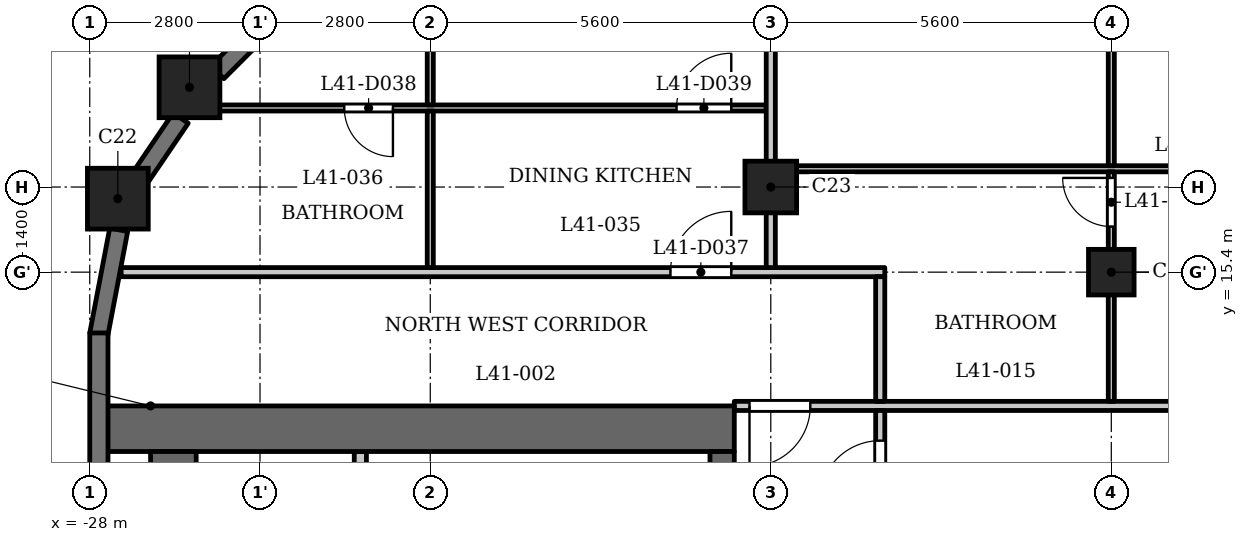
"""IFC4 building model, lengths in metres.
Left out: names, types, materials, properties, quantities, classifications, styles, units other than length and angle.
Written with IfcOpenShell. Run it as: python <this file> out.ifc"""

import sys

from ifc_helpers import new_model, si_unit, direction, frame, frame_2d, origin, origin_2d, place, context, subcontext, project, spatial, rectangle, extrude, element, fill, save


model = new_model("IFC4")
c1 = context("Model", 3, precision=1e-05, world=origin(), true_north=direction((0.0, 1.0)))
c2 = subcontext(c1, "Body", "Model", "MODEL_VIEW")
j1 = project(units=[si_unit("LENGTHUNIT", "METRE"), si_unit("PLANEANGLEUNIT", "RADIAN")], contexts=[c1])
p1 = place(None, origin())
s1 = spatial("IfcSite", under=j1, at=p1, CompositionType="ELEMENT")
p2 = place(p1, origin())
s2 = spatial("IfcBuilding", under=s1, at=p2, CompositionType="ELEMENT")
p3 = place(p2, frame((0.0, 0.0, 160.6)))
s3 = spatial("IfcBuildingStorey", under=s2, at=p3, CompositionType="ELEMENT", Elevation=160.6)
for number, where, z_axis, x_axis in (
    (1, (-26.36, 18.44, 0.0), (0.0, 0.0, 1.0), (1.0, 0.0, 0.0)),
    (2, (-27.538, 16.609, 0.0), (0.0, 0.0, 1.0), (1.0, 0.0, 0.0)),
):
    element("IfcColumn", number, at=place(p3, frame(where, z_axis=z_axis, x_axis=x_axis)), inside=s3, PredefinedType="COLUMN", context=c2, shape_type="SweptSolid", body=[
        extrude(rectangle(XDim=1.0, YDim=1.0, at=origin_2d()), origin(), (0.0, 0.0, 1.0), 3.5),
    ])
p4 = place(p3, frame((-16.8, 16.8, 0.0), z_axis=(0.0, 0.0, 1.0), x_axis=(1.0, 0.0, 0.0)))
e3 = element("IfcColumn", 3, at=p4, inside=s3, PredefinedType="COLUMN", context=c2, shape_type="SweptSolid", body=[
    extrude(rectangle(XDim=0.85, YDim=0.85, at=origin_2d()), origin(), (0.0, 0.0, 1.0), 3.5),
])
p5 = place(p3, frame((-11.2, 15.4, 0.0), z_axis=(0.0, 0.0, 1.0), x_axis=(1.0, 0.0, 0.0)))
e4 = element("IfcColumn", 4, at=p5, inside=s3, PredefinedType="COLUMN", context=c2, shape_type="SweptSolid", body=[
    extrude(rectangle(XDim=0.75, YDim=0.75, at=origin_2d()), origin(), (0.0, 0.0, 1.0), 3.5),
])
p6 = place(p3, frame((-23.991, 20.597, 0.0), z_axis=(0.0, 0.0, 1.0), x_axis=(-0.707106781187, -0.707106781187, 0.0)))
e5 = element("IfcWall", 5, at=p6, inside=s3, PredefinedType="SOLIDWALL", context=c2, shape_type="SweptSolid", body=[
    extrude(rectangle(XDim=2.7, YDim=0.3, at=frame_2d((1.35, 0.0))), origin(), (0.0, 0.0, 1.0), 2.45),
])
p7 = place(p6, frame((0.75, 0.0, 0.6)))
e6 = element("IfcOpeningElement", 6, at=p7, cuts=e5, PredefinedType="OPENING", context=c2, shape_type="SweptSolid", body=[
    extrude(rectangle(XDim=1.2, YDim=1.55, at=frame_2d((0.6, 0.775))), frame((0.0, 0.16, 0.0), z_axis=(0.0, -1.0, 0.0), x_axis=(1.0, 0.0, 0.0)), (0.0, 0.0, 1.0), 0.32),
])
p8 = place(p3, frame((-26.504, 17.934, 0.0), z_axis=(0.0, 0.0, 1.0), x_axis=(-0.562145470373, -0.827038372833, 0.0)))
e7 = element("IfcWall", 7, at=p8, inside=s3, PredefinedType="SOLIDWALL", context=c2, shape_type="SweptSolid", body=[
    extrude(rectangle(XDim=1.177, YDim=0.3, at=frame_2d((0.588, 0.0))), origin(), (0.0, 0.0, 1.0), 3.2),
])
p9 = place(p3, frame((-27.524, 16.097, 0.0), z_axis=(0.0, 0.0, 1.0), x_axis=(-0.187259034321, -0.982310569049, 0.0)))
e8 = element("IfcWall", 8, at=p9, inside=s3, PredefinedType="SOLIDWALL", context=c2, shape_type="SweptSolid", body=[
    extrude(rectangle(XDim=1.756, YDim=0.3, at=frame_2d((0.878, 0.0))), origin(), (0.0, 0.0, 1.0), 2.45),
])
p10 = place(p3, frame((-27.85, 14.4, 0.0), z_axis=(0.0, 0.0, 1.0), x_axis=(0.0, -1.0, 0.0)))
e9 = element("IfcWall", 9, at=p10, inside=s3, PredefinedType="SOLIDWALL", context=c2, shape_type="SweptSolid", body=[
    extrude(rectangle(XDim=2.7, YDim=0.3, at=frame_2d((1.35, 0.0))), origin(), (0.0, 0.0, 1.0), 2.45),
])
p11 = place(p3, frame((-17.4, 12.825, 0.0), z_axis=(0.0, 0.0, 1.0), x_axis=(-1.0, 0.0, 0.0)))
e10 = element("IfcWall", 10, at=p11, inside=s3, PredefinedType="SHEAR", context=c2, shape_type="SweptSolid", body=[
    extrude(rectangle(XDim=10.4, YDim=0.75, at=frame_2d((5.2, 0.0))), origin(), (0.0, 0.0, 1.0), 3.2),
])
p12 = place(p3, frame((-17.6, -12.45, 0.0), z_axis=(0.0, 0.0, 1.0), x_axis=(0.0, 1.0, 0.0)))
e11 = element("IfcWall", 11, at=p12, inside=s3, PredefinedType="SHEAR", context=c2, shape_type="SweptSolid", body=[
    extrude(rectangle(XDim=24.9, YDim=0.4, at=frame_2d((12.45, 0.0))), origin(), (0.0, 0.0, 1.0), 3.2),
])
p13 = place(p12, frame((8.65, 0.0, 0.0)))
e12 = element("IfcOpeningElement", 12, at=p13, cuts=e11, PredefinedType="OPENING", context=c2, shape_type="SweptSolid", body=[
    extrude(rectangle(XDim=0.9, YDim=2.1, at=frame_2d((0.45, 1.05))), frame((0.0, 0.21, 0.0), z_axis=(0.0, -1.0, 0.0), x_axis=(1.0, 0.0, 0.0)), (0.0, 0.0, 1.0), 0.42),
])
p14 = place(p12, frame((15.6, 0.0, 0.0)))
e13 = element("IfcOpeningElement", 13, at=p14, cuts=e11, PredefinedType="OPENING", context=c2, shape_type="SweptSolid", body=[
    extrude(rectangle(XDim=1.1, YDim=2.1, at=frame_2d((0.55, 1.05))), frame((0.0, 0.21, 0.0), z_axis=(0.0, -1.0, 0.0), x_axis=(1.0, 0.0, 0.0)), (0.0, 0.0, 1.0), 0.42),
])
p15 = place(p12, frame((18.0, 0.0, 0.0)))
e14 = element("IfcOpeningElement", 14, at=p15, cuts=e11, PredefinedType="OPENING", context=c2, shape_type="SweptSolid", body=[
    extrude(rectangle(XDim=1.1, YDim=2.1, at=frame_2d((0.55, 1.05))), frame((0.0, 0.21, 0.0), z_axis=(0.0, -1.0, 0.0), x_axis=(1.0, 0.0, 0.0)), (0.0, 0.0, 1.0), 0.42),
])
p16 = place(p12, frame((23.025, 0.0, 0.0)))
e15 = element("IfcOpeningElement", 15, at=p16, cuts=e11, PredefinedType="OPENING", context=c2, shape_type="SweptSolid", body=[
    extrude(rectangle(XDim=1.1, YDim=2.1, at=frame_2d((0.55, 1.05))), frame((0.0, 0.21, 0.0), z_axis=(0.0, -1.0, 0.0), x_axis=(1.0, 0.0, 0.0)), (0.0, 0.0, 1.0), 0.42),
])
p17 = place(p12, frame((0.775, 0.0, 0.0)))
e16 = element("IfcOpeningElement", 16, at=p17, cuts=e11, PredefinedType="OPENING", context=c2, shape_type="SweptSolid", body=[
    extrude(rectangle(XDim=1.1, YDim=2.1, at=frame_2d((0.55, 1.05))), frame((0.0, 0.21, 0.0), z_axis=(0.0, -1.0, 0.0), x_axis=(1.0, 0.0, 0.0)), (0.0, 0.0, 1.0), 0.42),
])
p18 = place(p12, frame((12.925, 0.0, 0.0)))
e17 = element("IfcOpeningElement", 17, at=p18, cuts=e11, PredefinedType="OPENING", context=c2, shape_type="SweptSolid", body=[
    extrude(rectangle(XDim=1.8, YDim=2.1, at=frame_2d((0.9, 1.05))), frame((0.0, 0.21, 0.0), z_axis=(0.0, -1.0, 0.0), x_axis=(1.0, 0.0, 0.0)), (0.0, 0.0, 1.0), 0.42),
])
p19 = place(p3, frame((-26.625, -12.45, 0.0), z_axis=(0.0, 0.0, 1.0), x_axis=(0.0, 1.0, 0.0)))
e18 = element("IfcWall", 18, at=p19, inside=s3, PredefinedType="SHEAR", context=c2, shape_type="SweptSolid", body=[
    extrude(rectangle(XDim=24.9, YDim=0.75, at=frame_2d((12.45, 0.0))), origin(), (0.0, 0.0, 1.0), 3.2),
])
p20 = place(p3, frame((-23.55, 9.8, 0.0), z_axis=(0.0, 0.0, 1.0), x_axis=(0.0, 1.0, 0.0)))
e19 = element("IfcWall", 19, at=p20, inside=s3, PredefinedType="PARTITIONING", context=c2, shape_type="SweptSolid", body=[
    extrude(rectangle(XDim=2.65, YDim=0.2, at=frame_2d((1.325, 0.0))), origin(), (0.0, 0.0, 1.0), 3.2),
])
p21 = place(p20, frame((0.875, 0.0, 0.0)))
e20 = element("IfcOpeningElement", 20, at=p21, cuts=e19, PredefinedType="OPENING", context=c2, shape_type="SweptSolid", body=[
    extrude(rectangle(XDim=0.9, YDim=2.1, at=frame_2d((0.45, 1.05))), frame((0.0, 0.11, 0.0), z_axis=(0.0, -1.0, 0.0), x_axis=(1.0, 0.0, 0.0)), (0.0, 0.0, 1.0), 0.22),
])
p22 = place(p3, frame((-17.4, 13.2, 0.0), z_axis=(0.0, 0.0, 1.0), x_axis=(1.0, 0.0, 0.0)))
e21 = element("IfcWall", 21, at=p22, inside=s3, PredefinedType="PARTITIONING", context=c2, shape_type="SweptSolid", body=[
    extrude(rectangle(XDim=34.8, YDim=0.15, at=frame_2d((17.4, 0.0))), origin(), (0.0, 0.0, 1.0), 3.2),
])
p23 = place(p22, frame((0.25, 0.0, 0.0)))
e22 = element("IfcOpeningElement", 22, at=p23, cuts=e21, PredefinedType="OPENING", context=c2, shape_type="SweptSolid", body=[
    extrude(rectangle(XDim=1.0, YDim=2.1, at=frame_2d((0.5, 1.05))), frame((0.0, 0.085, 0.0), z_axis=(0.0, -1.0, 0.0), x_axis=(1.0, 0.0, 0.0)), (0.0, 0.0, 1.0), 0.17),
])
p24 = place(p22, frame((33.65, 0.0, 0.0)))
e23 = element("IfcOpeningElement", 23, at=p24, cuts=e21, PredefinedType="OPENING", context=c2, shape_type="SweptSolid", body=[
    extrude(rectangle(XDim=1.0, YDim=2.1, at=frame_2d((0.5, 1.05))), frame((0.0, 0.085, 0.0), z_axis=(0.0, -1.0, 0.0), x_axis=(1.0, 0.0, 0.0)), (0.0, 0.0, 1.0), 0.17),
])
p25 = place(p22, frame((15.75, 0.0, 0.0)))
e24 = element("IfcOpeningElement", 24, at=p25, cuts=e21, PredefinedType="OPENING", context=c2, shape_type="SweptSolid", body=[
    extrude(rectangle(XDim=1.0, YDim=2.1, at=frame_2d((0.5, 1.05))), frame((0.0, 0.085, 0.0), z_axis=(0.0, -1.0, 0.0), x_axis=(1.0, 0.0, 0.0)), (0.0, 0.0, 1.0), 0.17),
])
p26 = place(p22, frame((20.85, 0.0, 0.0)))
e25 = element("IfcOpeningElement", 25, at=p26, cuts=e21, PredefinedType="OPENING", context=c2, shape_type="SweptSolid", body=[
    extrude(rectangle(XDim=1.0, YDim=2.1, at=frame_2d((0.5, 1.05))), frame((0.0, 0.085, 0.0), z_axis=(0.0, -1.0, 0.0), x_axis=(1.0, 0.0, 0.0)), (0.0, 0.0, 1.0), 0.17),
])
p27 = place(p22, frame((23.55, 0.0, 0.0)))
e26 = element("IfcOpeningElement", 26, at=p27, cuts=e21, PredefinedType="OPENING", context=c2, shape_type="SweptSolid", body=[
    extrude(rectangle(XDim=1.0, YDim=2.1, at=frame_2d((0.5, 1.05))), frame((0.0, 0.085, 0.0), z_axis=(0.0, -1.0, 0.0), x_axis=(1.0, 0.0, 0.0)), (0.0, 0.0, 1.0), 0.17),
])
p28 = place(p3, frame((-27.484, 15.4, 0.0), z_axis=(0.0, 0.0, 1.0), x_axis=(1.0, 0.0, 0.0)))
e27 = element("IfcWall", 27, at=p28, inside=s3, PredefinedType="PARTITIONING", context=c2, shape_type="SweptSolid", body=[
    extrude(rectangle(XDim=12.559, YDim=0.15, at=frame_2d((6.279, 0.0))), origin(), (0.0, 0.0, 1.0), 3.2),
])
p29 = place(p28, frame((9.034, 0.0, 0.0)))
e28 = element("IfcOpeningElement", 28, at=p29, cuts=e27, PredefinedType="OPENING", context=c2, shape_type="SweptSolid", body=[
    extrude(rectangle(XDim=1.0, YDim=2.1, at=frame_2d((0.5, 1.05))), frame((0.0, 0.085, 0.0), z_axis=(0.0, -1.0, 0.0), x_axis=(1.0, 0.0, 0.0)), (0.0, 0.0, 1.0), 0.17),
])
p30 = place(p3, frame((-16.725, 17.1, 0.0), z_axis=(0.0, 0.0, 1.0), x_axis=(1.0, 0.0, 0.0)))
e29 = element("IfcWall", 29, at=p30, inside=s3, PredefinedType="PARTITIONING", context=c2, shape_type="SweptSolid", body=[
    extrude(rectangle(XDim=33.45, YDim=0.1, at=frame_2d((16.725, 0.0))), origin(), (0.0, 0.0, 1.0), 3.2),
])
p31 = place(p30, frame((11.925, 0.0, 0.0)))
e30 = element("IfcOpeningElement", 30, at=p31, cuts=e29, PredefinedType="OPENING", context=c2, shape_type="SweptSolid", body=[
    extrude(rectangle(XDim=0.9, YDim=2.1, at=frame_2d((0.45, 1.05))), frame((0.0, 0.06, 0.0), z_axis=(0.0, -1.0, 0.0), x_axis=(1.0, 0.0, 0.0)), (0.0, 0.0, 1.0), 0.12),
])
p32 = place(p30, frame((15.175, 0.0, 0.0)))
e31 = element("IfcOpeningElement", 31, at=p32, cuts=e29, PredefinedType="OPENING", context=c2, shape_type="SweptSolid", body=[
    extrude(rectangle(XDim=0.9, YDim=2.1, at=frame_2d((0.45, 1.05))), frame((0.0, 0.06, 0.0), z_axis=(0.0, -1.0, 0.0), x_axis=(1.0, 0.0, 0.0)), (0.0, 0.0, 1.0), 0.12),
])
p33 = place(p30, frame((6.575, 0.0, 0.0)))
e32 = element("IfcOpeningElement", 32, at=p33, cuts=e29, PredefinedType="OPENING", context=c2, shape_type="SweptSolid", body=[
    extrude(rectangle(XDim=0.9, YDim=2.1, at=frame_2d((0.45, 1.05))), frame((0.0, 0.06, 0.0), z_axis=(0.0, -1.0, 0.0), x_axis=(1.0, 0.0, 0.0)), (0.0, 0.0, 1.0), 0.12),
])
p34 = place(p30, frame((17.375, 0.0, 0.0)))
e33 = element("IfcOpeningElement", 33, at=p34, cuts=e29, PredefinedType="OPENING", context=c2, shape_type="SweptSolid", body=[
    extrude(rectangle(XDim=0.8, YDim=2.1, at=frame_2d((0.4, 1.05))), frame((0.0, 0.06, 0.0), z_axis=(0.0, -1.0, 0.0), x_axis=(1.0, 0.0, 0.0)), (0.0, 0.0, 1.0), 0.12),
])
p35 = place(p30, frame((20.025, 0.0, 0.0)))
e34 = element("IfcOpeningElement", 34, at=p35, cuts=e29, PredefinedType="OPENING", context=c2, shape_type="SweptSolid", body=[
    extrude(rectangle(XDim=0.9, YDim=2.1, at=frame_2d((0.45, 1.05))), frame((0.0, 0.06, 0.0), z_axis=(0.0, -1.0, 0.0), x_axis=(1.0, 0.0, 0.0)), (0.0, 0.0, 1.0), 0.12),
])
p36 = place(p30, frame((26.425, 0.0, 0.0)))
e35 = element("IfcOpeningElement", 35, at=p36, cuts=e29, PredefinedType="OPENING", context=c2, shape_type="SweptSolid", body=[
    extrude(rectangle(XDim=0.8, YDim=2.1, at=frame_2d((0.4, 1.05))), frame((0.0, 0.06, 0.0), z_axis=(0.0, -1.0, 0.0), x_axis=(1.0, 0.0, 0.0)), (0.0, 0.0, 1.0), 0.12),
])
p37 = place(p30, frame((23.025, 0.0, 0.0)))
e36 = element("IfcOpeningElement", 36, at=p37, cuts=e29, PredefinedType="OPENING", context=c2, shape_type="SweptSolid", body=[
    extrude(rectangle(XDim=0.9, YDim=2.1, at=frame_2d((0.45, 1.05))), frame((0.0, 0.06, 0.0), z_axis=(0.0, -1.0, 0.0), x_axis=(1.0, 0.0, 0.0)), (0.0, 0.0, 1.0), 0.12),
])
p38 = place(p30, frame((28.575, 0.0, 0.0)))
e37 = element("IfcOpeningElement", 37, at=p38, cuts=e29, PredefinedType="OPENING", context=c2, shape_type="SweptSolid", body=[
    extrude(rectangle(XDim=0.8, YDim=2.1, at=frame_2d((0.4, 1.05))), frame((0.0, 0.06, 0.0), z_axis=(0.0, -1.0, 0.0), x_axis=(1.0, 0.0, 0.0)), (0.0, 0.0, 1.0), 0.12),
])
p39 = place(p30, frame((30.725, 0.0, 0.0)))
e38 = element("IfcOpeningElement", 38, at=p39, cuts=e29, PredefinedType="OPENING", context=c2, shape_type="SweptSolid", body=[
    extrude(rectangle(XDim=0.9, YDim=2.1, at=frame_2d((0.45, 1.05))), frame((0.0, 0.06, 0.0), z_axis=(0.0, -1.0, 0.0), x_axis=(1.0, 0.0, 0.0)), (0.0, 0.0, 1.0), 0.12),
])
p40 = place(p3, frame((-26.44, 18.1, 0.0), z_axis=(0.0, 0.0, 1.0), x_axis=(1.0, 0.0, 0.0)))
e39 = element("IfcWall", 39, at=p40, inside=s3, PredefinedType="PARTITIONING", context=c2, shape_type="SweptSolid", body=[
    extrude(rectangle(XDim=9.565, YDim=0.1, at=frame_2d((4.782, 0.0))), origin(), (0.0, 0.0, 1.0), 3.2),
])
p41 = place(p40, frame((2.626, 0.0, 0.0)))
e40 = element("IfcOpeningElement", 40, at=p41, cuts=e39, PredefinedType="OPENING", context=c2, shape_type="SweptSolid", body=[
    extrude(rectangle(XDim=0.8, YDim=2.1, at=frame_2d((0.4, 1.05))), frame((0.0, 0.06, 0.0), z_axis=(0.0, -1.0, 0.0), x_axis=(1.0, 0.0, 0.0)), (0.0, 0.0, 1.0), 0.12),
])
p42 = place(p40, frame((8.09, 0.0, 0.0)))
e41 = element("IfcOpeningElement", 41, at=p42, cuts=e39, PredefinedType="OPENING", context=c2, shape_type="SweptSolid", body=[
    extrude(rectangle(XDim=0.9, YDim=2.1, at=frame_2d((0.45, 1.05))), frame((0.0, 0.06, 0.0), z_axis=(0.0, -1.0, 0.0), x_axis=(1.0, 0.0, 0.0)), (0.0, 0.0, 1.0), 0.12),
])
p43 = place(p3, frame((-22.4, 15.475, 0.0), z_axis=(0.0, 0.0, 1.0), x_axis=(0.0, 1.0, 0.0)))
e42 = element("IfcWall", 42, at=p43, inside=s3, PredefinedType="PARTITIONING", context=c2, shape_type="SweptSolid", body=[
    extrude(rectangle(XDim=2.575, YDim=0.1, at=frame_2d((1.288, 0.0))), origin(), (0.0, 0.0, 1.0), 3.2),
])
p44 = place(p3, frame((-22.4, 18.15, 0.0), z_axis=(0.0, 0.0, 1.0), x_axis=(0.0, 1.0, 0.0)))
e43 = element("IfcWall", 43, at=p44, inside=s3, PredefinedType="PARTITIONING", context=c2, shape_type="SweptSolid", body=[
    extrude(rectangle(XDim=3.57, YDim=0.1, at=frame_2d((1.785, 0.0))), origin(), (0.0, 0.0, 1.0), 3.2),
])
p45 = place(p44, frame((1.298, 0.0, 0.0)))
e44 = element("IfcOpeningElement", 44, at=p45, cuts=e43, PredefinedType="OPENING", context=c2, shape_type="SweptSolid", body=[
    extrude(rectangle(XDim=0.9, YDim=2.1, at=frame_2d((0.45, 1.05))), frame((0.0, 0.06, 0.0), z_axis=(0.0, -1.0, 0.0), x_axis=(1.0, 0.0, 0.0)), (0.0, 0.0, 1.0), 0.12),
])
p46 = place(p3, frame((-16.8, 15.475, 0.0), z_axis=(0.0, 0.0, 1.0), x_axis=(0.0, 1.0, 0.0)))
e45 = element("IfcWall", 45, at=p46, inside=s3, PredefinedType="PARTITIONING", context=c2, shape_type="SweptSolid", body=[
    extrude(rectangle(XDim=7.405, YDim=0.15, at=frame_2d((3.702, 0.0))), origin(), (0.0, 0.0, 1.0), 3.2),
])
p47 = place(p3, frame((-15.0, 6.769, 0.0), z_axis=(0.0, 0.0, 1.0), x_axis=(0.0, 1.0, 0.0)))
e46 = element("IfcWall", 46, at=p47, inside=s3, PredefinedType="PARTITIONING", context=c2, shape_type="SweptSolid", body=[
    extrude(rectangle(XDim=6.356, YDim=0.15, at=frame_2d((3.178, 0.0))), origin(), (0.0, 0.0, 1.0), 3.2),
])
p48 = place(p47, frame((4.86, 0.0, 0.0)))
e47 = element("IfcOpeningElement", 47, at=p48, cuts=e46, PredefinedType="OPENING", context=c2, shape_type="SweptSolid", body=[
    extrude(rectangle(XDim=1.0, YDim=2.1, at=frame_2d((0.5, 1.05))), frame((0.0, 0.085, 0.0), z_axis=(0.0, -1.0, 0.0), x_axis=(1.0, 0.0, 0.0)), (0.0, 0.0, 1.0), 0.17),
])
p49 = place(p3, frame((-15.0, 13.275, 0.0), z_axis=(0.0, 0.0, 1.0), x_axis=(0.0, 1.0, 0.0)))
e48 = element("IfcWall", 48, at=p49, inside=s3, PredefinedType="PARTITIONING", context=c2, shape_type="SweptSolid", body=[
    extrude(rectangle(XDim=2.05, YDim=0.15, at=frame_2d((1.025, 0.0))), origin(), (0.0, 0.0, 1.0), 3.2),
])
p50 = place(p3, frame((-11.2, 13.275, 0.0), z_axis=(0.0, 0.0, 1.0), x_axis=(0.0, 1.0, 0.0)))
e49 = element("IfcWall", 49, at=p50, inside=s3, PredefinedType="PARTITIONING", context=c2, shape_type="SweptSolid", body=[
    extrude(rectangle(XDim=3.775, YDim=0.1, at=frame_2d((1.888, 0.0))), origin(), (0.0, 0.0, 1.0), 3.2),
])
p51 = place(p50, frame((2.875, 0.0, 0.0)))
e50 = element("IfcOpeningElement", 50, at=p51, cuts=e49, PredefinedType="OPENING", context=c2, shape_type="SweptSolid", body=[
    extrude(rectangle(XDim=0.8, YDim=2.1, at=frame_2d((0.4, 1.05))), frame((0.0, 0.06, 0.0), z_axis=(0.0, -1.0, 0.0), x_axis=(1.0, 0.0, 0.0)), (0.0, 0.0, 1.0), 0.12),
])
p52 = place(p3, frame((-11.2, 17.15, 0.0), z_axis=(0.0, 0.0, 1.0), x_axis=(0.0, 1.0, 0.0)))
e51 = element("IfcWall", 51, at=p52, inside=s3, PredefinedType="PARTITIONING", context=c2, shape_type="SweptSolid", body=[
    extrude(rectangle(XDim=5.73, YDim=0.1, at=frame_2d((2.865, 0.0))), origin(), (0.0, 0.0, 1.0), 3.2),
])
p53 = place(p52, frame((3.61, 0.0, 0.0)))
e52 = element("IfcOpeningElement", 52, at=p53, cuts=e51, PredefinedType="OPENING", context=c2, shape_type="SweptSolid", body=[
    extrude(rectangle(XDim=0.9, YDim=2.1, at=frame_2d((0.45, 1.05))), frame((0.0, 0.06, 0.0), z_axis=(0.0, -1.0, 0.0), x_axis=(1.0, 0.0, 0.0)), (0.0, 0.0, 1.0), 0.12),
])
p54 = place(p48, origin())
e53 = element("IfcDoor", 53, at=p54, inside=s3, OperationType="SINGLE_SWING_RIGHT", PredefinedType="DOOR", context=c2, shape_type="SweptSolid", body=[
    extrude(rectangle(XDim=1.0, YDim=2.1, at=frame_2d((0.5, 1.05))), frame((0.0, 0.025, 0.0), z_axis=(0.0, -1.0, 0.0), x_axis=(1.0, 0.0, 0.0)), (0.0, 0.0, 1.0), 0.05),
])
fill(e47, e53)
p55 = place(p23, origin())
e54 = element("IfcDoor", 54, at=p55, inside=s3, OperationType="SINGLE_SWING_LEFT", PredefinedType="DOOR", context=c2, shape_type="SweptSolid", body=[
    extrude(rectangle(XDim=1.0, YDim=2.1, at=frame_2d((0.5, 1.05))), frame((0.0, 0.025, 0.0), z_axis=(0.0, -1.0, 0.0), x_axis=(1.0, 0.0, 0.0)), (0.0, 0.0, 1.0), 0.05),
])
fill(e22, e54)
p56 = place(p51, origin())
e55 = element("IfcDoor", 55, at=p56, inside=s3, OperationType="SINGLE_SWING_LEFT", PredefinedType="DOOR", context=c2, shape_type="SweptSolid", body=[
    extrude(rectangle(XDim=0.8, YDim=2.1, at=frame_2d((0.4, 1.05))), frame((0.0, 0.025, 0.0), z_axis=(0.0, -1.0, 0.0), x_axis=(1.0, 0.0, 0.0)), (0.0, 0.0, 1.0), 0.05),
])
fill(e50, e55)
p57 = place(p29, origin())
e56 = element("IfcDoor", 56, at=p57, inside=s3, OperationType="SINGLE_SWING_LEFT", PredefinedType="DOOR", context=c2, shape_type="SweptSolid", body=[
    extrude(rectangle(XDim=1.0, YDim=2.1, at=frame_2d((0.5, 1.05))), frame((0.0, 0.025, 0.0), z_axis=(0.0, -1.0, 0.0), x_axis=(1.0, 0.0, 0.0)), (0.0, 0.0, 1.0), 0.05),
])
fill(e28, e56)
p58 = place(p41, origin())
e57 = element("IfcDoor", 57, at=p58, inside=s3, OperationType="SINGLE_SWING_RIGHT", PredefinedType="DOOR", context=c2, shape_type="SweptSolid", body=[
    extrude(rectangle(XDim=0.8, YDim=2.1, at=frame_2d((0.4, 1.05))), frame((0.0, 0.025, 0.0), z_axis=(0.0, -1.0, 0.0), x_axis=(1.0, 0.0, 0.0)), (0.0, 0.0, 1.0), 0.05),
])
fill(e40, e57)
p59 = place(p42, origin())
e58 = element("IfcDoor", 58, at=p59, inside=s3, OperationType="SINGLE_SWING_LEFT", PredefinedType="DOOR", context=c2, shape_type="SweptSolid", body=[
    extrude(rectangle(XDim=0.9, YDim=2.1, at=frame_2d((0.45, 1.05))), frame((0.0, 0.025, 0.0), z_axis=(0.0, -1.0, 0.0), x_axis=(1.0, 0.0, 0.0)), (0.0, 0.0, 1.0), 0.05),
])
fill(e41, e58)
save(model, sys.argv[1])
